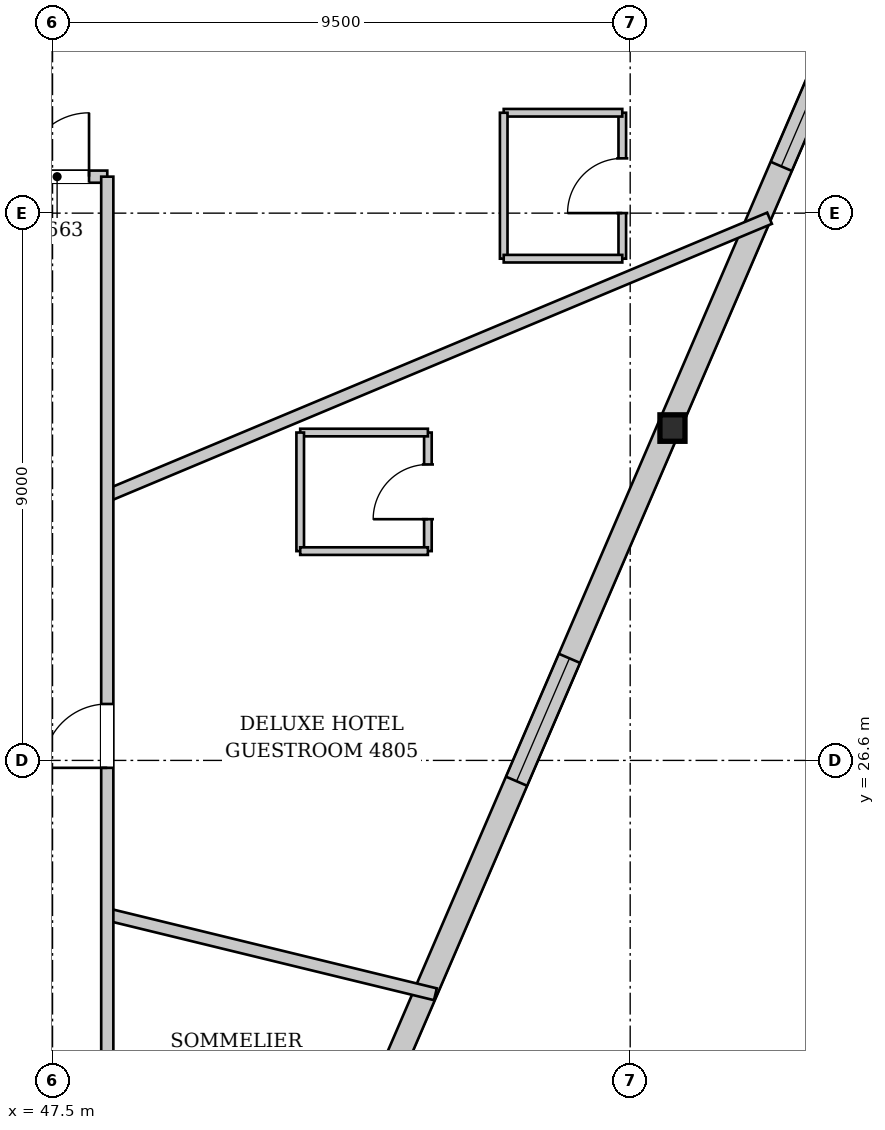
"""IFC4 building model, lengths in metres.
Left out: names, types, materials, properties, quantities, classifications, styles, units other than length and angle.
Written with IfcOpenShell. Run it as: python <this file> out.ifc"""

import sys

from ifc_helpers import new_model, si_unit, direction, frame, frame_2d, origin, origin_2d, place, context, subcontext, project, spatial, rectangle, i_section, extrude, source, transform, mapped, element, fill, save


model = new_model("IFC4")
c1 = context("Model", 3, precision=1e-05, world=origin(), true_north=direction((0.0, 1.0)))
c2 = subcontext(c1, "Body", "Model", "MODEL_VIEW")
j1 = project(units=[si_unit("LENGTHUNIT", "METRE"), si_unit("PLANEANGLEUNIT", "RADIAN")], contexts=[c1])
p1 = place(None, origin())
s1 = spatial("IfcSite", under=j1, at=p1, CompositionType="ELEMENT")
p2 = place(p1, origin())
s2 = spatial("IfcBuilding", under=s1, at=p2, CompositionType="ELEMENT")
p3 = place(p2, frame((0.0, 0.0, 182.1)))
s3 = spatial("IfcBuildingStorey", under=s2, at=p3, CompositionType="ELEMENT", Elevation=182.1)
m1 = source(origin(), c2, "Body", "SweptSolid", [
    extrude(i_section(OverallWidth=0.412, OverallDepth=0.435, WebThickness=0.031, FlangeThickness=0.05, at=origin_2d()), origin(), (0.0, 0.0, 1.0), 3.404),
])
p4 = place(p3, frame((57.769, 31.905, 0.0), z_axis=(-0.043541791354, 0.094472058012, 0.994574855232), x_axis=(-0.908181269279, -0.418577092219, 0.0)))
e1 = element("IfcColumn", 1, at=p4, inside=s3, PredefinedType="COLUMN", context=c2, shape_type="MappedRepresentation", body=[
    mapped(m1, transform((0.0, 0.0, 0.0), x_axis=(1.0, 0.0, 0.0), y_axis=(0.0, 1.0, 0.0), z_axis=(0.0, 0.0, 1.0), scale=1.0)),
])
p5 = place(p3, frame((62.205, 42.688, 0.0), z_axis=(0.0, 0.0, 1.0), x_axis=(-0.395471845497, -0.918478099586, 0.0)))
e2 = element("IfcWall", 2, at=p5, inside=s3, PredefinedType="SOLIDWALL", context=c2, shape_type="SweptSolid", body=[
    extrude(rectangle(XDim=23.316, YDim=0.38, at=frame_2d((11.658, 0.0))), origin(), (0.0, 0.0, 1.0), 2.722),
])
p6 = place(p5, frame((4.679, 0.0, 0.352)))
e3 = element("IfcOpeningElement", 3, at=p6, cuts=e2, PredefinedType="OPENING", context=c2, shape_type="SweptSolid", body=[
    extrude(rectangle(XDim=2.2, YDim=2.25, at=frame_2d((1.1, 1.125))), frame((0.0, 0.2, 0.0), z_axis=(0.0, -1.0, 0.0), x_axis=(1.0, 0.0, 0.0)), (0.0, 0.0, 1.0), 0.4),
])
p7 = place(p5, frame((15.688, 0.0, 0.352)))
e4 = element("IfcOpeningElement", 4, at=p7, cuts=e2, PredefinedType="OPENING", context=c2, shape_type="SweptSolid", body=[
    extrude(rectangle(XDim=2.2, YDim=2.25, at=frame_2d((1.1, 1.125))), frame((0.0, 0.2, 0.0), z_axis=(0.0, -1.0, 0.0), x_axis=(1.0, 0.0, 0.0)), (0.0, 0.0, 1.0), 0.4),
])
p8 = place(p3, frame((48.4, 24.068, 0.0), z_axis=(0.0, 0.0, 1.0), x_axis=(0.971626118901, -0.23652206043, 0.0)))
e5 = element("IfcWall", 5, at=p8, inside=s3, PredefinedType="PARTITIONING", context=c2, shape_type="SweptSolid", body=[
    extrude(rectangle(XDim=5.554, YDim=0.2, at=frame_2d((2.777, 0.0))), origin(), (0.0, 0.0, 1.0), 3.33),
])
p9 = place(p3, frame((48.4, 30.955, 0.0), z_axis=(0.0, 0.0, 1.0), x_axis=(0.922383605096, 0.386275141641, 0.0)))
e6 = element("IfcWall", 6, at=p9, inside=s3, PredefinedType="PARTITIONING", context=c2, shape_type="SweptSolid", body=[
    extrude(rectangle(XDim=11.808, YDim=0.2, at=frame_2d((5.904, 0.0))), origin(), (0.0, 0.0, 1.0), 3.33),
])
p10 = place(p3, frame((43.739, 36.2, 0.0), z_axis=(0.0, 0.0, 1.0), x_axis=(0.51314560482, 0.858301571858, 0.0)))
e7 = element("IfcWall", 7, at=p10, inside=s3, PredefinedType="PARTITIONING", context=c2, shape_type="SweptSolid", body=[
    extrude(rectangle(XDim=9.125, YDim=0.2, at=frame_2d((4.562, 0.0))), origin(), (0.0, 0.0, 1.0), 3.33),
])
p11 = place(p3, frame((53.673, 30.042, 0.0), z_axis=(0.0, 0.0, 1.0), x_axis=(0.0, 1.0, 0.0)))
e8 = element("IfcWall", 8, at=p11, inside=s3, PredefinedType="PARTITIONING", context=c2, shape_type="SweptSolid", body=[
    extrude(rectangle(XDim=1.95, YDim=0.125, at=frame_2d((0.975, 0.0))), origin(), (0.0, 0.0, 1.0), 3.33),
])
p12 = place(p11, frame((0.525, 0.0, 0.0)))
e9 = element("IfcOpeningElement", 9, at=p12, cuts=e8, PredefinedType="OPENING", context=c2, shape_type="SweptSolid", body=[
    extrude(rectangle(XDim=0.9, YDim=2.1, at=frame_2d((0.45, 1.05))), frame((0.0, 0.073, 0.0), z_axis=(0.0, -1.0, 0.0), x_axis=(1.0, 0.0, 0.0)), (0.0, 0.0, 1.0), 0.145),
])
p13 = place(p3, frame((53.673, 31.992, 0.0), z_axis=(0.0, 0.0, 1.0), x_axis=(-1.0, 0.0, 0.0)))
e10 = element("IfcWall", 10, at=p13, inside=s3, PredefinedType="PARTITIONING", context=c2, shape_type="SweptSolid", body=[
    extrude(rectangle(XDim=2.1, YDim=0.125, at=frame_2d((1.05, 0.0))), origin(), (0.0, 0.0, 1.0), 3.33),
])
p14 = place(p3, frame((51.573, 31.992, 0.0), z_axis=(0.0, 0.0, 1.0), x_axis=(0.0, -1.0, 0.0)))
e11 = element("IfcWall", 11, at=p14, inside=s3, PredefinedType="PARTITIONING", context=c2, shape_type="SweptSolid", body=[
    extrude(rectangle(XDim=1.95, YDim=0.125, at=frame_2d((0.975, 0.0))), origin(), (0.0, 0.0, 1.0), 3.33),
])
p15 = place(p3, frame((51.573, 30.042, 0.0), z_axis=(0.0, 0.0, 1.0), x_axis=(1.0, 0.0, 0.0)))
e12 = element("IfcWall", 12, at=p15, inside=s3, PredefinedType="PARTITIONING", context=c2, shape_type="SweptSolid", body=[
    extrude(rectangle(XDim=2.1, YDim=0.125, at=frame_2d((1.05, 0.0))), origin(), (0.0, 0.0, 1.0), 3.33),
])
p16 = place(p3, frame((56.87, 34.851, 0.0), z_axis=(0.0, 0.0, 1.0), x_axis=(0.0, 1.0, 0.0)))
e13 = element("IfcWall", 13, at=p16, inside=s3, PredefinedType="PARTITIONING", context=c2, shape_type="SweptSolid", body=[
    extrude(rectangle(XDim=2.4, YDim=0.125, at=frame_2d((1.2, 0.0))), origin(), (0.0, 0.0, 1.0), 3.33),
])
p17 = place(p16, frame((0.75, 0.0, 0.0)))
e14 = element("IfcOpeningElement", 14, at=p17, cuts=e13, PredefinedType="OPENING", context=c2, shape_type="SweptSolid", body=[
    extrude(rectangle(XDim=0.9, YDim=2.1, at=frame_2d((0.45, 1.05))), frame((0.0, 0.073, 0.0), z_axis=(0.0, -1.0, 0.0), x_axis=(1.0, 0.0, 0.0)), (0.0, 0.0, 1.0), 0.145),
])
p18 = place(p3, frame((56.87, 37.251, 0.0), z_axis=(0.0, 0.0, 1.0), x_axis=(-1.0, 0.0, 0.0)))
e15 = element("IfcWall", 15, at=p18, inside=s3, PredefinedType="PARTITIONING", context=c2, shape_type="SweptSolid", body=[
    extrude(rectangle(XDim=1.95, YDim=0.125, at=frame_2d((0.975, 0.0))), origin(), (0.0, 0.0, 1.0), 3.33),
])
p19 = place(p3, frame((54.92, 37.251, 0.0), z_axis=(0.0, 0.0, 1.0), x_axis=(0.0, -1.0, 0.0)))
e16 = element("IfcWall", 16, at=p19, inside=s3, PredefinedType="PARTITIONING", context=c2, shape_type="SweptSolid", body=[
    extrude(rectangle(XDim=2.4, YDim=0.125, at=frame_2d((1.2, 0.0))), origin(), (0.0, 0.0, 1.0), 3.33),
])
p20 = place(p3, frame((54.92, 34.851, 0.0), z_axis=(0.0, 0.0, 1.0), x_axis=(1.0, 0.0, 0.0)))
e17 = element("IfcWall", 17, at=p20, inside=s3, PredefinedType="PARTITIONING", context=c2, shape_type="SweptSolid", body=[
    extrude(rectangle(XDim=1.95, YDim=0.125, at=frame_2d((0.975, 0.0))), origin(), (0.0, 0.0, 1.0), 3.33),
])
p21 = place(p3, frame((43.4, 36.2, 0.0), z_axis=(0.0, 0.0, 1.0), x_axis=(1.0, 0.0, 0.0)))
e18 = element("IfcWall", 18, at=p21, inside=s3, PredefinedType="PARTITIONING", context=c2, shape_type="SweptSolid", body=[
    extrude(rectangle(XDim=5.0, YDim=0.2, at=frame_2d((2.5, 0.0))), origin(), (0.0, 0.0, 1.0), 3.33),
])
p22 = place(p21, frame((3.65, 0.0, 0.0)))
e19 = element("IfcOpeningElement", 19, at=p22, cuts=e18, PredefinedType="OPENING", context=c2, shape_type="SweptSolid", body=[
    extrude(rectangle(XDim=1.05, YDim=2.2, at=frame_2d((0.525, 1.1))), frame((0.0, 0.11, 0.0), z_axis=(0.0, -1.0, 0.0), x_axis=(1.0, 0.0, 0.0)), (0.0, 0.0, 1.0), 0.22),
])
p23 = place(p3, frame((48.4, 17.0, 0.0), z_axis=(0.0, 0.0, 1.0), x_axis=(0.0, 1.0, 0.0)))
e20 = element("IfcWall", 20, at=p23, inside=s3, PredefinedType="PARTITIONING", context=c2, shape_type="SweptSolid", body=[
    extrude(rectangle(XDim=19.2, YDim=0.2, at=frame_2d((9.6, 0.0))), origin(), (0.0, 0.0, 1.0), 3.33),
])
p24 = place(p23, frame((9.478, 0.0, 0.0)))
e21 = element("IfcOpeningElement", 21, at=p24, cuts=e20, PredefinedType="OPENING", context=c2, shape_type="SweptSolid", body=[
    extrude(rectangle(XDim=1.05, YDim=2.2, at=frame_2d((0.525, 1.1))), frame((0.0, 0.11, 0.0), z_axis=(0.0, -1.0, 0.0), x_axis=(1.0, 0.0, 0.0)), (0.0, 0.0, 1.0), 0.22),
])
m2 = source(origin(), c2, "Body", "SweptSolid", [
    extrude(rectangle(XDim=2.2, YDim=2.25, at=frame_2d((1.1, 1.125))), frame((0.0, 0.03, 0.0), z_axis=(0.0, -1.0, 0.0), x_axis=(1.0, 0.0, 0.0)), (0.0, 0.0, 1.0), 0.06),
])
p25 = place(p6, origin())
e22 = element("IfcWindow", 22, at=p25, inside=s3, PartitioningType="SINGLE_PANEL", PredefinedType="WINDOW", context=c2, shape_type="MappedRepresentation", body=[
    mapped(m2, transform((0.0, 0.0, 0.0), x_axis=(1.0, 0.0, 0.0), y_axis=(0.0, 1.0, 0.0), z_axis=(0.0, 0.0, 1.0), scale=1.0)),
])
fill(e3, e22)
p26 = place(p7, origin())
e23 = element("IfcWindow", 23, at=p26, inside=s3, PartitioningType="SINGLE_PANEL", PredefinedType="WINDOW", context=c2, shape_type="MappedRepresentation", body=[
    mapped(m2, transform((0.0, 0.0, 0.0), x_axis=(1.0, 0.0, 0.0), y_axis=(0.0, 1.0, 0.0), z_axis=(0.0, 0.0, 1.0), scale=1.0)),
])
fill(e4, e23)
m3 = source(origin(), c2, "Body", "SweptSolid", [
    extrude(rectangle(XDim=0.9, YDim=2.1, at=frame_2d((0.45, 1.05))), frame((0.0, 0.025, 0.0), z_axis=(0.0, -1.0, 0.0), x_axis=(1.0, 0.0, 0.0)), (0.0, 0.0, 1.0), 0.05),
])
p27 = place(p12, origin())
e24 = element("IfcDoor", 24, at=p27, inside=s3, OperationType="SINGLE_SWING_LEFT", PredefinedType="DOOR", context=c2, shape_type="MappedRepresentation", body=[
    mapped(m3, transform((0.0, 0.0, 0.0), x_axis=(1.0, 0.0, 0.0), y_axis=(0.0, 1.0, 0.0), z_axis=(0.0, 0.0, 1.0), scale=1.0)),
])
fill(e9, e24)
p28 = place(p17, origin())
e25 = element("IfcDoor", 25, at=p28, inside=s3, OperationType="SINGLE_SWING_LEFT", PredefinedType="DOOR", context=c2, shape_type="MappedRepresentation", body=[
    mapped(m3, transform((0.0, 0.0, 0.0), x_axis=(1.0, 0.0, 0.0), y_axis=(0.0, 1.0, 0.0), z_axis=(0.0, 0.0, 1.0), scale=1.0)),
])
fill(e14, e25)
m4 = source(origin(), c2, "Body", "SweptSolid", [
    extrude(rectangle(XDim=1.05, YDim=2.2, at=frame_2d((0.525, 1.1))), frame((0.0, 0.025, 0.0), z_axis=(0.0, -1.0, 0.0), x_axis=(1.0, 0.0, 0.0)), (0.0, 0.0, 1.0), 0.05),
])
p29 = place(p22, origin())
e26 = element("IfcDoor", 26, at=p29, inside=s3, OperationType="SINGLE_SWING_RIGHT", PredefinedType="DOOR", context=c2, shape_type="MappedRepresentation", body=[
    mapped(m4, transform((0.0, 0.0, 0.0), x_axis=(1.0, 0.0, 0.0), y_axis=(0.0, 1.0, 0.0), z_axis=(0.0, 0.0, 1.0), scale=1.0)),
])
fill(e19, e26)
p30 = place(p24, origin())
e27 = element("IfcDoor", 27, at=p30, inside=s3, OperationType="SINGLE_SWING_LEFT", PredefinedType="DOOR", context=c2, shape_type="MappedRepresentation", body=[
    mapped(m4, transform((0.0, 0.0, 0.0), x_axis=(1.0, 0.0, 0.0), y_axis=(0.0, 1.0, 0.0), z_axis=(0.0, 0.0, 1.0), scale=1.0)),
])
fill(e21, e27)
save(model, sys.argv[1])
